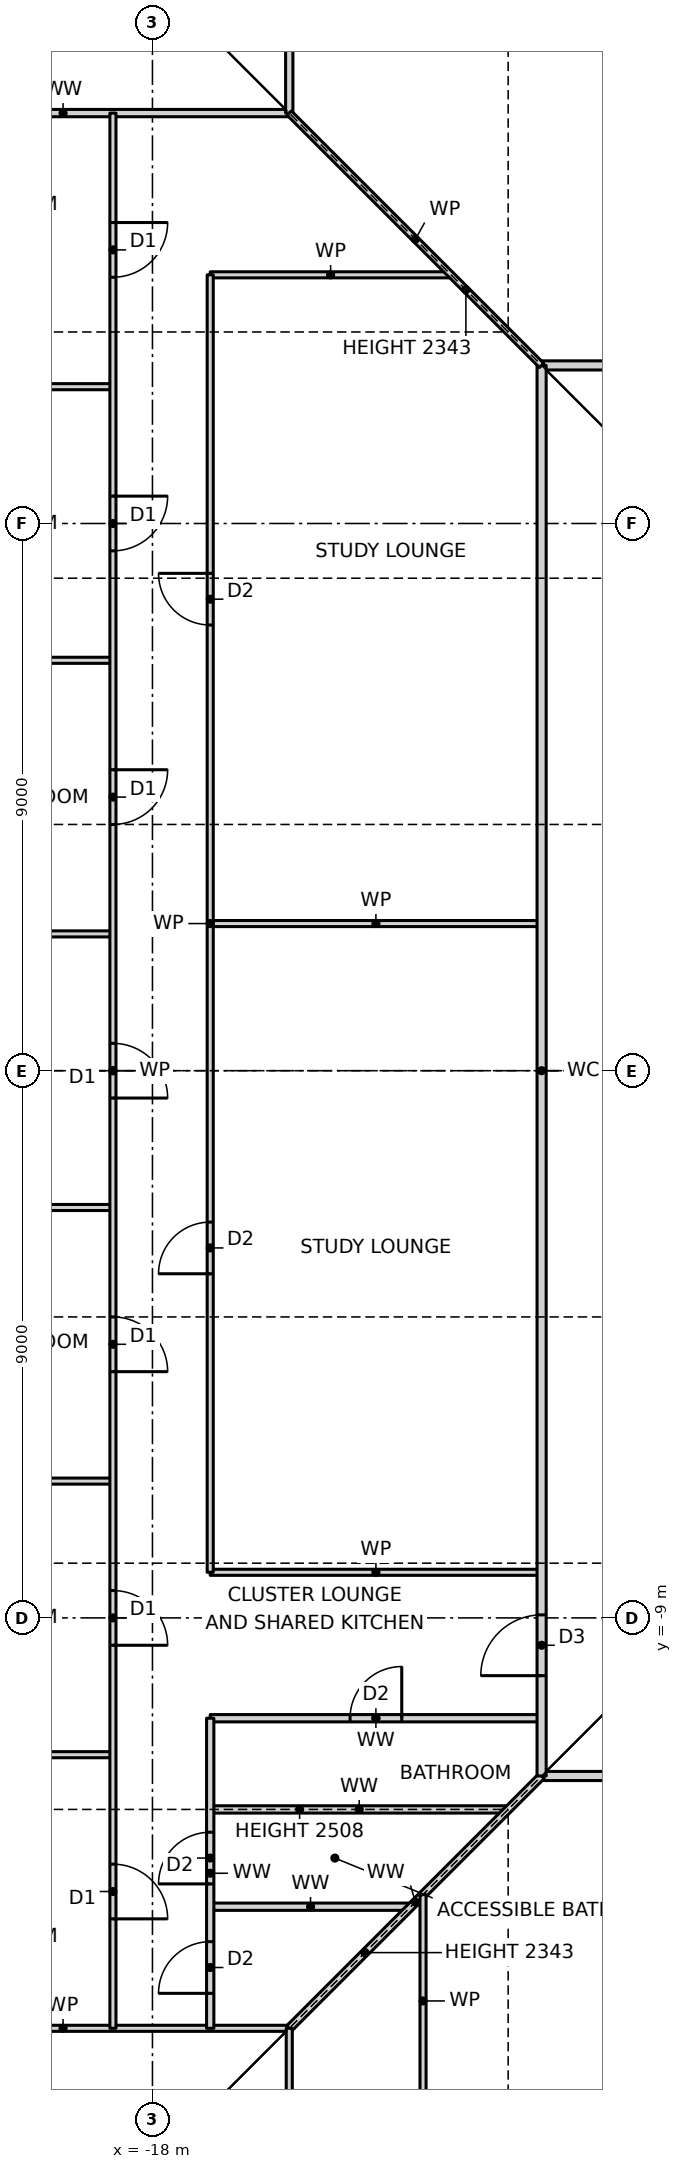
"""IFC4 building model, lengths in metres.
Left out: names, types, materials, properties, quantities, classifications, styles, units other than length and angle.
Written with IfcOpenShell. Run it as: python <this file> out.ifc"""

import sys

from ifc_helpers import new_model, si_unit, direction, frame, frame_2d, origin, place, context, subcontext, project, spatial, rectangle, extrude, element, fill, save


model = new_model("IFC4")
c1 = context("Model", 3, precision=1e-05, world=origin(), true_north=direction((0.0, 1.0)))
c2 = subcontext(c1, "Body", "Model", "MODEL_VIEW")
j1 = project(units=[si_unit("LENGTHUNIT", "METRE"), si_unit("PLANEANGLEUNIT", "RADIAN")], contexts=[c1])
p1 = place(None, origin())
s1 = spatial("IfcSite", under=j1, at=p1, CompositionType="ELEMENT")
p2 = place(p1, origin())
s2 = spatial("IfcBuilding", under=s1, at=p2, CompositionType="ELEMENT")
p3 = place(p2, frame((0.0, 0.0, 32.5)))
s3 = spatial("IfcBuildingStorey", under=s2, at=p3, CompositionType="ELEMENT", Elevation=32.5)
p4 = place(p3, frame((-23.19, -15.75, 0.0), z_axis=(0.0, 0.0, 1.0), x_axis=(1.0, 0.0, 0.0)))
e1 = element("IfcWall", 1, at=p4, inside=s3, PredefinedType="PARTITIONING", context=c2, shape_type="SweptSolid", body=[
    extrude(rectangle(XDim=7.44, YDim=0.1, at=frame_2d((3.72, 0.0))), origin(), (0.0, 0.0, 1.0), 3.27),
])
p5 = place(p3, frame((-17.05, -13.75, 0.0), z_axis=(0.0, 0.0, 1.0), x_axis=(1.0, 0.0, 0.0)))
e2 = element("IfcWall", 2, at=p5, inside=s3, PredefinedType="PARTITIONING", context=c2, shape_type="SweptSolid", body=[
    extrude(rectangle(XDim=3.3, YDim=0.12, at=frame_2d((1.65, 0.0))), origin(), (0.0, 0.0, 1.0), 3.27),
])
p6 = place(p3, frame((-17.05, -12.15, 0.0), z_axis=(0.0, 0.0, 1.0), x_axis=(1.0, 0.0, 0.0)))
e3 = element("IfcWall", 3, at=p6, inside=s3, PredefinedType="PARTITIONING", context=c2, shape_type="SweptSolid", body=[
    extrude(rectangle(XDim=4.9, YDim=0.12, at=frame_2d((2.45, 0.0))), origin(), (0.0, 0.0, 1.0), 2.508),
])
p7 = place(p3, frame((-11.6, -11.6, 0.0), z_axis=(0.0, 0.0, 1.0), x_axis=(1.0, 0.0, 0.0)))
e4 = element("IfcWall", 4, at=p7, inside=s3, PredefinedType="PARTITIONING", context=c2, shape_type="SweptSolid", body=[
    extrude(rectangle(XDim=24.2, YDim=0.15, at=frame_2d((12.1, 0.0))), origin(), (0.0, 0.0, 1.0), 3.27),
])
p8 = place(p7, frame((14.25, 0.0, 0.0)))
e5 = element("IfcOpeningElement", 5, at=p8, cuts=e4, PredefinedType="OPENING", context=c2, shape_type="SweptSolid", body=[
    extrude(rectangle(XDim=1.0, YDim=2.1, at=frame_2d((0.5, 1.05))), frame((0.0, 0.085, 0.0), z_axis=(0.0, -1.0, 0.0), x_axis=(1.0, 0.0, 0.0)), (0.0, 0.0, 1.0), 0.17),
])
p9 = place(p7, frame((16.4, 0.0, 0.0)))
e6 = element("IfcOpeningElement", 6, at=p9, cuts=e4, PredefinedType="OPENING", context=c2, shape_type="SweptSolid", body=[
    extrude(rectangle(XDim=0.9, YDim=2.1, at=frame_2d((0.45, 1.05))), frame((0.0, 0.085, 0.0), z_axis=(0.0, -1.0, 0.0), x_axis=(1.0, 0.0, 0.0)), (0.0, 0.0, 1.0), 0.17),
])
p10 = place(p3, frame((-23.19, -11.25, 0.0), z_axis=(0.0, 0.0, 1.0), x_axis=(1.0, 0.0, 0.0)))
e7 = element("IfcWall", 7, at=p10, inside=s3, PredefinedType="PARTITIONING", context=c2, shape_type="SweptSolid", body=[
    extrude(rectangle(XDim=4.54, YDim=0.1, at=frame_2d((2.27, 0.0))), origin(), (0.0, 0.0, 1.0), 3.27),
])
p11 = place(p3, frame((-17.05, -10.65, 0.0), z_axis=(0.0, 0.0, 1.0), x_axis=(1.0, 0.0, 0.0)))
e8 = element("IfcWall", 8, at=p11, inside=s3, PredefinedType="PARTITIONING", context=c2, shape_type="SweptSolid", body=[
    extrude(rectangle(XDim=5.45, YDim=0.12, at=frame_2d((2.725, 0.0))), origin(), (0.0, 0.0, 1.0), 3.27),
])
p12 = place(p11, frame((2.3, 0.0, 0.0)))
e9 = element("IfcOpeningElement", 9, at=p12, cuts=e8, PredefinedType="OPENING", context=c2, shape_type="SweptSolid", body=[
    extrude(rectangle(XDim=0.85, YDim=2.1, at=frame_2d((0.425, 1.05))), frame((0.0, 0.07, 0.0), z_axis=(0.0, -1.0, 0.0), x_axis=(1.0, 0.0, 0.0)), (0.0, 0.0, 1.0), 0.14),
])
p13 = place(p3, frame((-17.05, -8.25, 0.0), z_axis=(0.0, 0.0, 1.0), x_axis=(1.0, 0.0, 0.0)))
e10 = element("IfcWall", 10, at=p13, inside=s3, PredefinedType="PARTITIONING", context=c2, shape_type="SweptSolid", body=[
    extrude(rectangle(XDim=5.45, YDim=0.1, at=frame_2d((2.725, 0.0))), origin(), (0.0, 0.0, 1.0), 3.27),
])
for number, where, z_axis, x_axis in (
    (11, (-23.19, -6.75, 0.0), (0.0, 0.0, 1.0), (1.0, 0.0, 0.0)),
    (12, (-23.19, -2.25, 0.0), (0.0, 0.0, 1.0), (1.0, 0.0, 0.0)),
    (13, (-23.19, 2.25, 0.0), (0.0, 0.0, 1.0), (1.0, 0.0, 0.0)),
):
    element("IfcWall", number, at=place(p3, frame(where, z_axis=z_axis, x_axis=x_axis)), inside=s3, PredefinedType="PARTITIONING", context=c2, shape_type="SweptSolid", body=[
        extrude(rectangle(XDim=4.54, YDim=0.1, at=frame_2d((2.27, 0.0))), origin(), (0.0, 0.0, 1.0), 3.27),
    ])
p14 = place(p3, frame((-17.05, 2.42, 0.0), z_axis=(0.0, 0.0, 1.0), x_axis=(1.0, 0.0, 0.0)))
e14 = element("IfcWall", 14, at=p14, inside=s3, PredefinedType="PARTITIONING", context=c2, shape_type="SweptSolid", body=[
    extrude(rectangle(XDim=5.45, YDim=0.1, at=frame_2d((2.725, 0.0))), origin(), (0.0, 0.0, 1.0), 3.27),
])
for number, where, z_axis, x_axis in (
    (15, (-23.19, 6.75, 0.0), (0.0, 0.0, 1.0), (1.0, 0.0, 0.0)),
    (16, (-23.19, 11.25, 0.0), (0.0, 0.0, 1.0), (1.0, 0.0, 0.0)),
):
    element("IfcWall", number, at=place(p3, frame(where, z_axis=z_axis, x_axis=x_axis)), inside=s3, PredefinedType="PARTITIONING", context=c2, shape_type="SweptSolid", body=[
        extrude(rectangle(XDim=4.54, YDim=0.1, at=frame_2d((2.27, 0.0))), origin(), (0.0, 0.0, 1.0), 3.27),
    ])
p15 = place(p3, frame((-11.6, 11.6, 0.0), z_axis=(0.0, 0.0, 1.0), x_axis=(1.0, 0.0, 0.0)))
e17 = element("IfcWall", 17, at=p15, inside=s3, PredefinedType="PARTITIONING", context=c2, shape_type="SweptSolid", body=[
    extrude(rectangle(XDim=24.2, YDim=0.15, at=frame_2d((12.1, 0.0))), origin(), (0.0, 0.0, 1.0), 3.27),
])
p16 = place(p15, frame((12.855, 0.0, 0.0)))
e18 = element("IfcOpeningElement", 18, at=p16, cuts=e17, PredefinedType="OPENING", context=c2, shape_type="SweptSolid", body=[
    extrude(rectangle(XDim=1.0, YDim=2.1, at=frame_2d((0.5, 1.05))), frame((0.0, 0.085, 0.0), z_axis=(0.0, -1.0, 0.0), x_axis=(1.0, 0.0, 0.0)), (0.0, 0.0, 1.0), 0.17),
])
p17 = place(p3, frame((-17.05, 13.09, 0.0), z_axis=(0.0, 0.0, 1.0), x_axis=(1.0, 0.0, 0.0)))
e19 = element("IfcWall", 19, at=p17, inside=s3, PredefinedType="PARTITIONING", context=c2, shape_type="SweptSolid", body=[
    extrude(rectangle(XDim=3.96, YDim=0.1, at=frame_2d((1.98, 0.0))), origin(), (0.0, 0.0, 1.0), 3.27),
])
p18 = place(p3, frame((-23.19, 15.75, 0.0), z_axis=(0.0, 0.0, 1.0), x_axis=(1.0, 0.0, 0.0)))
e20 = element("IfcWall", 20, at=p18, inside=s3, PredefinedType="PARTITIONING", context=c2, shape_type="SweptSolid", body=[
    extrude(rectangle(XDim=7.44, YDim=0.12, at=frame_2d((3.72, 0.0))), origin(), (0.0, 0.0, 1.0), 3.27),
])
p19 = place(p3, frame((-15.75, -15.75, 0.0), z_axis=(0.0, 0.0, 1.0), x_axis=(0.707106781187, 0.707106781187, 0.0)))
e21 = element("IfcWall", 21, at=p19, inside=s3, PredefinedType="PARTITIONING", context=c2, shape_type="SweptSolid", body=[
    extrude(rectangle(XDim=5.869, YDim=0.12, at=frame_2d((2.935, 0.0))), origin(), (0.0, 0.0, 1.0), 2.343),
])
p20 = place(p3, frame((-11.6, -11.6, 0.0), z_axis=(0.0, 0.0, 1.0), x_axis=(0.0, 1.0, 0.0)))
e22 = element("IfcWall", 22, at=p20, inside=s3, PredefinedType="PARTITIONING", context=c2, shape_type="SweptSolid", body=[
    extrude(rectangle(XDim=23.2, YDim=0.15, at=frame_2d((11.6, 0.0))), origin(), (0.0, 0.0, 1.0), 3.27),
])
p21 = place(p20, frame((1.65, 0.0, 0.0)))
e23 = element("IfcOpeningElement", 23, at=p21, cuts=e22, PredefinedType="OPENING", context=c2, shape_type="SweptSolid", body=[
    extrude(rectangle(XDim=1.0, YDim=2.1, at=frame_2d((0.5, 1.05))), frame((0.0, 0.085, 0.0), z_axis=(0.0, -1.0, 0.0), x_axis=(1.0, 0.0, 0.0)), (0.0, 0.0, 1.0), 0.17),
])
p22 = place(p3, frame((-13.55, -17.05, 0.0), z_axis=(0.0, 0.0, 1.0), x_axis=(0.0, 1.0, 0.0)))
e24 = element("IfcWall", 24, at=p22, inside=s3, PredefinedType="PARTITIONING", context=c2, shape_type="SweptSolid", body=[
    extrude(rectangle(XDim=3.5, YDim=0.1, at=frame_2d((1.75, 0.0))), origin(), (0.0, 0.0, 1.0), 3.27),
])
p23 = place(p3, frame((-15.75, -23.19, 0.0), z_axis=(0.0, 0.0, 1.0), x_axis=(0.0, 1.0, 0.0)))
e25 = element("IfcWall", 25, at=p23, inside=s3, PredefinedType="PARTITIONING", context=c2, shape_type="SweptSolid", body=[
    extrude(rectangle(XDim=7.44, YDim=0.1, at=frame_2d((3.72, 0.0))), origin(), (0.0, 0.0, 1.0), 3.27),
])
p24 = place(p23, frame((4.915, 0.0, 0.0)))
e26 = element("IfcOpeningElement", 26, at=p24, cuts=e25, PredefinedType="OPENING", context=c2, shape_type="SweptSolid", body=[
    extrude(rectangle(XDim=0.85, YDim=2.1, at=frame_2d((0.425, 1.05))), frame((0.0, 0.06, 0.0), z_axis=(0.0, -1.0, 0.0), x_axis=(1.0, 0.0, 0.0)), (0.0, 0.0, 1.0), 0.12),
])
p25 = place(p3, frame((-15.75, 15.75, 0.0), z_axis=(0.0, 0.0, 1.0), x_axis=(0.0, 1.0, 0.0)))
e27 = element("IfcWall", 27, at=p25, inside=s3, PredefinedType="PARTITIONING", context=c2, shape_type="SweptSolid", body=[
    extrude(rectangle(XDim=7.44, YDim=0.12, at=frame_2d((3.72, 0.0))), origin(), (0.0, 0.0, 1.0), 3.27),
])
p26 = place(p25, frame((1.675, 0.0, 0.0)))
e28 = element("IfcOpeningElement", 28, at=p26, cuts=e27, PredefinedType="OPENING", context=c2, shape_type="SweptSolid", body=[
    extrude(rectangle(XDim=0.85, YDim=2.1, at=frame_2d((0.425, 1.05))), frame((0.0, 0.07, 0.0), z_axis=(0.0, -1.0, 0.0), x_axis=(1.0, 0.0, 0.0)), (0.0, 0.0, 1.0), 0.14),
])
p27 = place(p3, frame((-17.05, -15.75, 0.0), z_axis=(0.0, 0.0, 1.0), x_axis=(0.0, 1.0, 0.0)))
e29 = element("IfcWall", 29, at=p27, inside=s3, PredefinedType="PARTITIONING", context=c2, shape_type="SweptSolid", body=[
    extrude(rectangle(XDim=5.1, YDim=0.12, at=frame_2d((2.55, 0.0))), origin(), (0.0, 0.0, 1.0), 3.27),
])
p28 = place(p27, frame((2.375, 0.0, 0.0)))
e30 = element("IfcOpeningElement", 30, at=p28, cuts=e29, PredefinedType="OPENING", context=c2, shape_type="SweptSolid", body=[
    extrude(rectangle(XDim=0.85, YDim=2.1, at=frame_2d((0.425, 1.05))), frame((0.0, 0.07, 0.0), z_axis=(0.0, -1.0, 0.0), x_axis=(1.0, 0.0, 0.0)), (0.0, 0.0, 1.0), 0.14),
])
p29 = place(p27, frame((0.575, 0.0, 0.0)))
e31 = element("IfcOpeningElement", 31, at=p29, cuts=e29, PredefinedType="OPENING", context=c2, shape_type="SweptSolid", body=[
    extrude(rectangle(XDim=0.85, YDim=2.1, at=frame_2d((0.425, 1.05))), frame((0.0, 0.07, 0.0), z_axis=(0.0, -1.0, 0.0), x_axis=(1.0, 0.0, 0.0)), (0.0, 0.0, 1.0), 0.14),
])
p30 = place(p3, frame((-17.05, -8.25, 0.0), z_axis=(0.0, 0.0, 1.0), x_axis=(0.0, 1.0, 0.0)))
e32 = element("IfcWall", 32, at=p30, inside=s3, PredefinedType="PARTITIONING", context=c2, shape_type="SweptSolid", body=[
    extrude(rectangle(XDim=21.34, YDim=0.1, at=frame_2d((10.67, 0.0))), origin(), (0.0, 0.0, 1.0), 3.27),
])
p31 = place(p30, frame((15.58, 0.0, 0.0)))
e33 = element("IfcOpeningElement", 33, at=p31, cuts=e32, PredefinedType="OPENING", context=c2, shape_type="SweptSolid", body=[
    extrude(rectangle(XDim=0.85, YDim=2.1, at=frame_2d((0.425, 1.05))), frame((0.0, 0.06, 0.0), z_axis=(0.0, -1.0, 0.0), x_axis=(1.0, 0.0, 0.0)), (0.0, 0.0, 1.0), 0.12),
])
p32 = place(p30, frame((4.91, 0.0, 0.0)))
e34 = element("IfcOpeningElement", 34, at=p32, cuts=e32, PredefinedType="OPENING", context=c2, shape_type="SweptSolid", body=[
    extrude(rectangle(XDim=0.85, YDim=2.1, at=frame_2d((0.425, 1.05))), frame((0.0, 0.06, 0.0), z_axis=(0.0, -1.0, 0.0), x_axis=(1.0, 0.0, 0.0)), (0.0, 0.0, 1.0), 0.12),
])
p33 = place(p3, frame((-18.65, -15.75, 0.0), z_axis=(0.0, 0.0, 1.0), x_axis=(0.0, 1.0, 0.0)))
e35 = element("IfcWall", 35, at=p33, inside=s3, PredefinedType="PARTITIONING", context=c2, shape_type="SweptSolid", body=[
    extrude(rectangle(XDim=31.5, YDim=0.1, at=frame_2d((15.75, 0.0))), origin(), (0.0, 0.0, 1.0), 3.27),
])
p34 = place(p33, frame((28.8, 0.0, 0.0)))
e36 = element("IfcOpeningElement", 36, at=p34, cuts=e35, PredefinedType="OPENING", context=c2, shape_type="SweptSolid", body=[
    extrude(rectangle(XDim=0.9, YDim=2.1, at=frame_2d((0.45, 1.05))), frame((0.0, 0.06, 0.0), z_axis=(0.0, -1.0, 0.0), x_axis=(1.0, 0.0, 0.0)), (0.0, 0.0, 1.0), 0.12),
])
p35 = place(p33, frame((24.3, 0.0, 0.0)))
e37 = element("IfcOpeningElement", 37, at=p35, cuts=e35, PredefinedType="OPENING", context=c2, shape_type="SweptSolid", body=[
    extrude(rectangle(XDim=0.9, YDim=2.1, at=frame_2d((0.45, 1.05))), frame((0.0, 0.06, 0.0), z_axis=(0.0, -1.0, 0.0), x_axis=(1.0, 0.0, 0.0)), (0.0, 0.0, 1.0), 0.12),
])
p36 = place(p33, frame((19.8, 0.0, 0.0)))
e38 = element("IfcOpeningElement", 38, at=p36, cuts=e35, PredefinedType="OPENING", context=c2, shape_type="SweptSolid", body=[
    extrude(rectangle(XDim=0.9, YDim=2.1, at=frame_2d((0.45, 1.05))), frame((0.0, 0.06, 0.0), z_axis=(0.0, -1.0, 0.0), x_axis=(1.0, 0.0, 0.0)), (0.0, 0.0, 1.0), 0.12),
])
p37 = place(p33, frame((15.3, 0.0, 0.0)))
e39 = element("IfcOpeningElement", 39, at=p37, cuts=e35, PredefinedType="OPENING", context=c2, shape_type="SweptSolid", body=[
    extrude(rectangle(XDim=0.9, YDim=2.1, at=frame_2d((0.45, 1.05))), frame((0.0, 0.06, 0.0), z_axis=(0.0, -1.0, 0.0), x_axis=(1.0, 0.0, 0.0)), (0.0, 0.0, 1.0), 0.12),
])
p38 = place(p33, frame((10.8, 0.0, 0.0)))
e40 = element("IfcOpeningElement", 40, at=p38, cuts=e35, PredefinedType="OPENING", context=c2, shape_type="SweptSolid", body=[
    extrude(rectangle(XDim=0.9, YDim=2.1, at=frame_2d((0.45, 1.05))), frame((0.0, 0.06, 0.0), z_axis=(0.0, -1.0, 0.0), x_axis=(1.0, 0.0, 0.0)), (0.0, 0.0, 1.0), 0.12),
])
p39 = place(p33, frame((6.3, 0.0, 0.0)))
e41 = element("IfcOpeningElement", 41, at=p39, cuts=e35, PredefinedType="OPENING", context=c2, shape_type="SweptSolid", body=[
    extrude(rectangle(XDim=0.9, YDim=2.1, at=frame_2d((0.45, 1.05))), frame((0.0, 0.06, 0.0), z_axis=(0.0, -1.0, 0.0), x_axis=(1.0, 0.0, 0.0)), (0.0, 0.0, 1.0), 0.12),
])
p40 = place(p33, frame((1.8, 0.0, 0.0)))
e42 = element("IfcOpeningElement", 42, at=p40, cuts=e35, PredefinedType="OPENING", context=c2, shape_type="SweptSolid", body=[
    extrude(rectangle(XDim=0.9, YDim=2.1, at=frame_2d((0.45, 1.05))), frame((0.0, 0.06, 0.0), z_axis=(0.0, -1.0, 0.0), x_axis=(1.0, 0.0, 0.0)), (0.0, 0.0, 1.0), 0.12),
])
p41 = place(p3, frame((-11.6, 11.6, 0.0), z_axis=(0.0, 0.0, 1.0), x_axis=(-0.707106781187, 0.707106781187, 0.0)))
e43 = element("IfcWall", 43, at=p41, inside=s3, PredefinedType="PARTITIONING", context=c2, shape_type="SweptSolid", body=[
    extrude(rectangle(XDim=5.869, YDim=0.1, at=frame_2d((2.935, 0.0))), origin(), (0.0, 0.0, 1.0), 2.343),
])
p42 = place(p34, frame((0.9, 0.0, 0.0), z_axis=(0.0, 0.0, 1.0), x_axis=(-1.0, 0.0, 0.0)))
e44 = element("IfcDoor", 44, at=p42, inside=s3, OperationType="SINGLE_SWING_LEFT", PredefinedType="DOOR", context=c2, shape_type="SweptSolid", body=[
    extrude(rectangle(XDim=0.9, YDim=2.1, at=frame_2d((0.45, 1.05))), frame((0.0, 0.025, 0.0), z_axis=(0.0, -1.0, 0.0), x_axis=(1.0, 0.0, 0.0)), (0.0, 0.0, 1.0), 0.05),
])
fill(e36, e44)
p43 = place(p35, frame((0.9, 0.0, 0.0), z_axis=(0.0, 0.0, 1.0), x_axis=(-1.0, 0.0, 0.0)))
e45 = element("IfcDoor", 45, at=p43, inside=s3, OperationType="SINGLE_SWING_LEFT", PredefinedType="DOOR", context=c2, shape_type="SweptSolid", body=[
    extrude(rectangle(XDim=0.9, YDim=2.1, at=frame_2d((0.45, 1.05))), frame((0.0, 0.025, 0.0), z_axis=(0.0, -1.0, 0.0), x_axis=(1.0, 0.0, 0.0)), (0.0, 0.0, 1.0), 0.05),
])
fill(e37, e45)
p44 = place(p36, frame((0.9, 0.0, 0.0), z_axis=(0.0, 0.0, 1.0), x_axis=(-1.0, 0.0, 0.0)))
e46 = element("IfcDoor", 46, at=p44, inside=s3, OperationType="SINGLE_SWING_LEFT", PredefinedType="DOOR", context=c2, shape_type="SweptSolid", body=[
    extrude(rectangle(XDim=0.9, YDim=2.1, at=frame_2d((0.45, 1.05))), frame((0.0, 0.025, 0.0), z_axis=(0.0, -1.0, 0.0), x_axis=(1.0, 0.0, 0.0)), (0.0, 0.0, 1.0), 0.05),
])
fill(e38, e46)
p45 = place(p37, frame((0.9, 0.0, 0.0), z_axis=(0.0, 0.0, 1.0), x_axis=(-1.0, 0.0, 0.0)))
e47 = element("IfcDoor", 47, at=p45, inside=s3, OperationType="SINGLE_SWING_RIGHT", PredefinedType="DOOR", context=c2, shape_type="SweptSolid", body=[
    extrude(rectangle(XDim=0.9, YDim=2.1, at=frame_2d((0.45, 1.05))), frame((0.0, 0.025, 0.0), z_axis=(0.0, -1.0, 0.0), x_axis=(1.0, 0.0, 0.0)), (0.0, 0.0, 1.0), 0.05),
])
fill(e39, e47)
p46 = place(p38, frame((0.9, 0.0, 0.0), z_axis=(0.0, 0.0, 1.0), x_axis=(-1.0, 0.0, 0.0)))
e48 = element("IfcDoor", 48, at=p46, inside=s3, OperationType="SINGLE_SWING_RIGHT", PredefinedType="DOOR", context=c2, shape_type="SweptSolid", body=[
    extrude(rectangle(XDim=0.9, YDim=2.1, at=frame_2d((0.45, 1.05))), frame((0.0, 0.025, 0.0), z_axis=(0.0, -1.0, 0.0), x_axis=(1.0, 0.0, 0.0)), (0.0, 0.0, 1.0), 0.05),
])
fill(e40, e48)
p47 = place(p39, frame((0.9, 0.0, 0.0), z_axis=(0.0, 0.0, 1.0), x_axis=(-1.0, 0.0, 0.0)))
e49 = element("IfcDoor", 49, at=p47, inside=s3, OperationType="SINGLE_SWING_RIGHT", PredefinedType="DOOR", context=c2, shape_type="SweptSolid", body=[
    extrude(rectangle(XDim=0.9, YDim=2.1, at=frame_2d((0.45, 1.05))), frame((0.0, 0.025, 0.0), z_axis=(0.0, -1.0, 0.0), x_axis=(1.0, 0.0, 0.0)), (0.0, 0.0, 1.0), 0.05),
])
fill(e41, e49)
p48 = place(p40, frame((0.9, 0.0, 0.0), z_axis=(0.0, 0.0, 1.0), x_axis=(-1.0, 0.0, 0.0)))
e50 = element("IfcDoor", 50, at=p48, inside=s3, OperationType="SINGLE_SWING_RIGHT", PredefinedType="DOOR", context=c2, shape_type="SweptSolid", body=[
    extrude(rectangle(XDim=0.9, YDim=2.1, at=frame_2d((0.45, 1.05))), frame((0.0, 0.025, 0.0), z_axis=(0.0, -1.0, 0.0), x_axis=(1.0, 0.0, 0.0)), (0.0, 0.0, 1.0), 0.05),
])
fill(e42, e50)
p49 = place(p21, origin())
e51 = element("IfcDoor", 51, at=p49, inside=s3, OperationType="SINGLE_SWING_LEFT", PredefinedType="DOOR", context=c2, shape_type="SweptSolid", body=[
    extrude(rectangle(XDim=1.0, YDim=2.1, at=frame_2d((0.5, 1.05))), frame((0.0, 0.025, 0.0), z_axis=(0.0, -1.0, 0.0), x_axis=(1.0, 0.0, 0.0)), (0.0, 0.0, 1.0), 0.05),
])
fill(e23, e51)
p50 = place(p31, origin())
e52 = element("IfcDoor", 52, at=p50, inside=s3, OperationType="SINGLE_SWING_RIGHT", PredefinedType="DOOR", context=c2, shape_type="SweptSolid", body=[
    extrude(rectangle(XDim=0.85, YDim=2.1, at=frame_2d((0.425, 1.05))), frame((0.0, 0.025, 0.0), z_axis=(0.0, -1.0, 0.0), x_axis=(1.0, 0.0, 0.0)), (0.0, 0.0, 1.0), 0.05),
])
fill(e33, e52)
p51 = place(p32, origin())
e53 = element("IfcDoor", 53, at=p51, inside=s3, OperationType="SINGLE_SWING_LEFT", PredefinedType="DOOR", context=c2, shape_type="SweptSolid", body=[
    extrude(rectangle(XDim=0.85, YDim=2.1, at=frame_2d((0.425, 1.05))), frame((0.0, 0.025, 0.0), z_axis=(0.0, -1.0, 0.0), x_axis=(1.0, 0.0, 0.0)), (0.0, 0.0, 1.0), 0.05),
])
fill(e34, e53)
p52 = place(p12, origin())
e54 = element("IfcDoor", 54, at=p52, inside=s3, OperationType="SINGLE_SWING_RIGHT", PredefinedType="DOOR", context=c2, shape_type="SweptSolid", body=[
    extrude(rectangle(XDim=0.85, YDim=2.1, at=frame_2d((0.425, 1.05))), frame((0.0, 0.025, 0.0), z_axis=(0.0, -1.0, 0.0), x_axis=(1.0, 0.0, 0.0)), (0.0, 0.0, 1.0), 0.05),
])
fill(e9, e54)
p53 = place(p28, origin())
e55 = element("IfcDoor", 55, at=p53, inside=s3, OperationType="SINGLE_SWING_LEFT", PredefinedType="DOOR", context=c2, shape_type="SweptSolid", body=[
    extrude(rectangle(XDim=0.85, YDim=2.1, at=frame_2d((0.425, 1.05))), frame((0.0, 0.025, 0.0), z_axis=(0.0, -1.0, 0.0), x_axis=(1.0, 0.0, 0.0)), (0.0, 0.0, 1.0), 0.05),
])
fill(e30, e55)
p54 = place(p29, origin())
e56 = element("IfcDoor", 56, at=p54, inside=s3, OperationType="SINGLE_SWING_LEFT", PredefinedType="DOOR", context=c2, shape_type="SweptSolid", body=[
    extrude(rectangle(XDim=0.85, YDim=2.1, at=frame_2d((0.425, 1.05))), frame((0.0, 0.025, 0.0), z_axis=(0.0, -1.0, 0.0), x_axis=(1.0, 0.0, 0.0)), (0.0, 0.0, 1.0), 0.05),
])
fill(e31, e56)
save(model, sys.argv[1])
